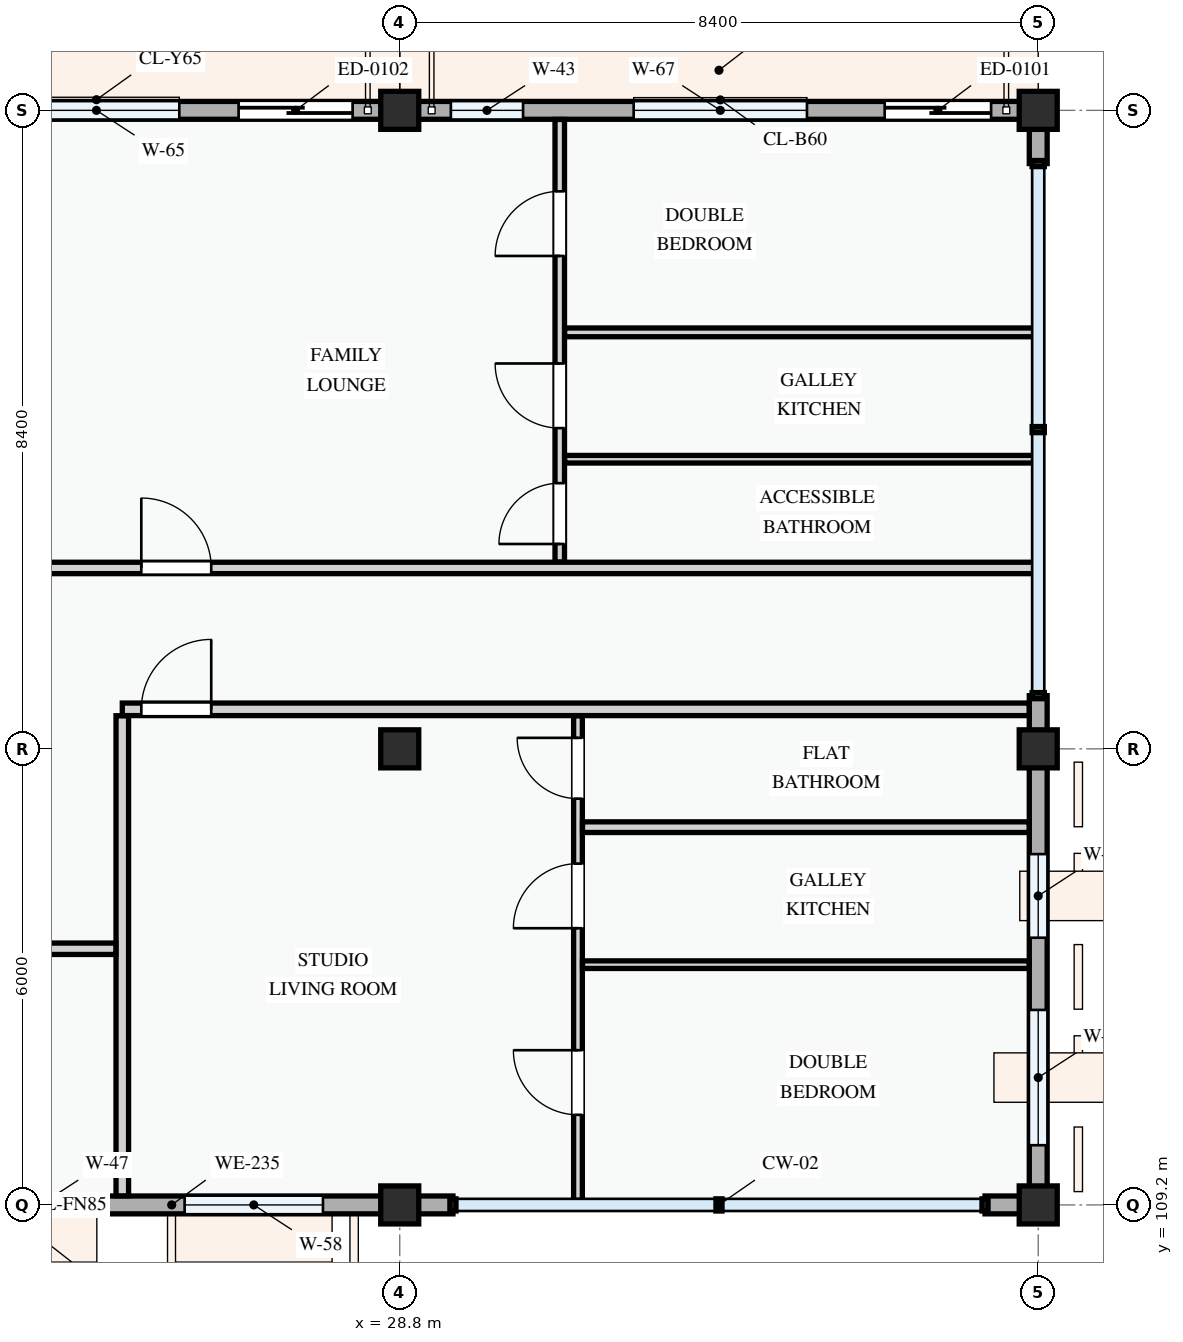
"""IFC4 building model, lengths in metres.
Left out: names, types, materials, properties, quantities, classifications, styles, units other than length and angle.
Written with IfcOpenShell. Run it as: python <this file> out.ifc"""

import sys

from ifc_helpers import new_model, si_unit, direction, frame, frame_2d, origin, origin_2d, place, context, subcontext, project, spatial, rectangle, extrude, element, fill, save


model = new_model("IFC4")
c1 = context("Model", 3, precision=1e-05, world=origin(), true_north=direction((0.0, 1.0)))
c2 = subcontext(c1, "Body", "Model", "MODEL_VIEW")
j1 = project(units=[si_unit("LENGTHUNIT", "METRE"), si_unit("PLANEANGLEUNIT", "RADIAN")], contexts=[c1])
p1 = place(None, origin())
s1 = spatial("IfcSite", under=j1, at=p1, CompositionType="ELEMENT")
p2 = place(p1, origin())
s2 = spatial("IfcBuilding", under=s1, at=p2, CompositionType="ELEMENT")
p3 = place(p2, frame((0.0, 0.0, 44.4)))
s3 = spatial("IfcBuildingStorey", under=s2, at=p3, CompositionType="ELEMENT", Elevation=44.4)
for number, where, z_axis, x_axis in (
    (1, (28.8, 109.2, 0.0), (0.0, 0.0, 1.0), (1.0, 0.0, 0.0)),
    (2, (28.8, 115.2, 0.0), (0.0, 0.0, 1.0), (1.0, 0.0, 0.0)),
    (3, (28.8, 123.6, 0.0), (0.0, 0.0, 1.0), (1.0, 0.0, 0.0)),
    (4, (37.2, 109.2, 0.0), (0.0, 0.0, 1.0), (1.0, 0.0, 0.0)),
    (5, (37.2, 115.2, 0.0), (0.0, 0.0, 1.0), (1.0, 0.0, 0.0)),
    (6, (37.2, 123.6, 0.0), (0.0, 0.0, 1.0), (1.0, 0.0, 0.0)),
):
    element("IfcColumn", number, at=place(p3, frame(where, z_axis=z_axis, x_axis=x_axis)), inside=s3, PredefinedType="COLUMN", context=c2, shape_type="SweptSolid", body=[
        extrude(rectangle(XDim=0.5, YDim=0.5, at=origin_2d()), origin(), (0.0, 0.0, 1.0), 3.3),
    ])
p4 = place(p3, frame((22.8, 109.2, 0.0), z_axis=(0.0, 0.0, 1.0), x_axis=(1.0, 0.0, 0.0)))
e7 = element("IfcWall", 7, at=p4, inside=s3, PredefinedType="STANDARD", context=c2, shape_type="SweptSolid", body=[
    extrude(rectangle(XDim=6.0, YDim=0.235, at=frame_2d((3.0, 0.0))), origin(), (0.0, 0.0, 1.0), 2.525),
])
p5 = place(p4, frame((0.645, 0.0, 0.78)))
e8 = element("IfcOpeningElement", 8, at=p5, cuts=e7, PredefinedType="OPENING", context=c2, shape_type="SweptSolid", body=[
    extrude(rectangle(XDim=1.25, YDim=1.45, at=frame_2d((0.625, 0.725))), frame((0.0, 0.127, 0.0), z_axis=(0.0, -1.0, 0.0), x_axis=(1.0, 0.0, 0.0)), (0.0, 0.0, 1.0), 0.255),
])
p6 = place(p4, frame((3.17, 0.0, 0.78)))
e9 = element("IfcOpeningElement", 9, at=p6, cuts=e7, PredefinedType="OPENING", context=c2, shape_type="SweptSolid", body=[
    extrude(rectangle(XDim=1.82, YDim=1.46, at=frame_2d((0.91, 0.73))), frame((0.0, 0.127, 0.0), z_axis=(0.0, -1.0, 0.0), x_axis=(1.0, 0.0, 0.0)), (0.0, 0.0, 1.0), 0.255),
])
p7 = place(p3, frame((28.8, 109.2, 0.0), z_axis=(0.0, 0.0, 1.0), x_axis=(1.0, 0.0, 0.0)))
e10 = element("IfcWall", 10, at=p7, inside=s3, PredefinedType="STANDARD", context=c2, shape_type="SweptSolid", body=[
    extrude(rectangle(XDim=0.7, YDim=0.235, at=frame_2d((0.35, 0.0))), origin(), (0.0, 0.0, 1.0), 2.375),
])
p8 = place(p3, frame((36.5, 109.2, 0.0), z_axis=(0.0, 0.0, 1.0), x_axis=(1.0, 0.0, 0.0)))
e11 = element("IfcWall", 11, at=p8, inside=s3, PredefinedType="STANDARD", context=c2, shape_type="SweptSolid", body=[
    extrude(rectangle(XDim=0.581, YDim=0.235, at=frame_2d((0.29, 0.0))), origin(), (0.0, 0.0, 1.0), 2.375),
])
p9 = place(p3, frame((37.2, 109.2, 0.0), z_axis=(0.0, 0.0, 1.0), x_axis=(0.0, 1.0, 0.0)))
e12 = element("IfcWall", 12, at=p9, inside=s3, PredefinedType="STANDARD", context=c2, shape_type="SweptSolid", body=[
    extrude(rectangle(XDim=6.0, YDim=0.235, at=frame_2d((3.0, 0.0))), origin(), (0.0, 0.0, 1.0), 2.575),
])
p10 = place(p9, frame((0.785, 0.0, 0.78)))
e13 = element("IfcOpeningElement", 13, at=p10, cuts=e12, PredefinedType="OPENING", context=c2, shape_type="SweptSolid", body=[
    extrude(rectangle(XDim=1.78, YDim=1.42, at=frame_2d((0.89, 0.71))), frame((0.0, 0.127, 0.0), z_axis=(0.0, -1.0, 0.0), x_axis=(1.0, 0.0, 0.0)), (0.0, 0.0, 1.0), 0.255),
])
p11 = place(p9, frame((3.515, 0.0, 0.78)))
e14 = element("IfcOpeningElement", 14, at=p11, cuts=e12, PredefinedType="OPENING", context=c2, shape_type="SweptSolid", body=[
    extrude(rectangle(XDim=1.1, YDim=1.3, at=frame_2d((0.55, 0.65))), frame((0.0, 0.127, 0.0), z_axis=(0.0, -1.0, 0.0), x_axis=(1.0, 0.0, 0.0)), (0.0, 0.0, 1.0), 0.255),
])
p12 = place(p3, frame((37.2, 115.2, 0.0), z_axis=(0.0, 0.0, 1.0), x_axis=(0.0, 1.0, 0.0)))
e15 = element("IfcWall", 15, at=p12, inside=s3, PredefinedType="STANDARD", context=c2, shape_type="SweptSolid", body=[
    extrude(rectangle(XDim=0.7, YDim=0.235, at=frame_2d((0.35, 0.0))), origin(), (0.0, 0.0, 1.0), 2.425),
])
p13 = place(p3, frame((37.2, 122.9, 0.0), z_axis=(0.0, 0.0, 1.0), x_axis=(0.0, 1.0, 0.0)))
e16 = element("IfcWall", 16, at=p13, inside=s3, PredefinedType="STANDARD", context=c2, shape_type="SweptSolid", body=[
    extrude(rectangle(XDim=0.581, YDim=0.235, at=frame_2d((0.29, 0.0))), origin(), (0.0, 0.0, 1.0), 2.425),
])
p14 = place(p3, frame((37.2, 123.6, 0.0), z_axis=(0.0, 0.0, 1.0), x_axis=(-1.0, 0.0, 0.0)))
e17 = element("IfcWall", 17, at=p14, inside=s3, PredefinedType="STANDARD", context=c2, shape_type="SweptSolid", body=[
    extrude(rectangle(XDim=8.4, YDim=0.235, at=frame_2d((4.2, 0.0))), origin(), (0.0, 0.0, 1.0), 2.375),
])
p15 = place(p14, frame((0.62, 0.0, 0.0)))
e18 = element("IfcOpeningElement", 18, at=p15, cuts=e17, PredefinedType="OPENING", context=c2, shape_type="SweptSolid", body=[
    extrude(rectangle(XDim=1.4, YDim=2.2, at=frame_2d((0.7, 1.1))), frame((0.0, 0.127, 0.0), z_axis=(0.0, -1.0, 0.0), x_axis=(1.0, 0.0, 0.0)), (0.0, 0.0, 1.0), 0.255),
])
p16 = place(p14, frame((3.042, 0.0, 0.78)))
e19 = element("IfcOpeningElement", 19, at=p16, cuts=e17, PredefinedType="OPENING", context=c2, shape_type="SweptSolid", body=[
    extrude(rectangle(XDim=2.28, YDim=1.46, at=frame_2d((1.14, 0.73))), frame((0.0, 0.127, 0.0), z_axis=(0.0, -1.0, 0.0), x_axis=(1.0, 0.0, 0.0)), (0.0, 0.0, 1.0), 0.255),
])
p17 = place(p14, frame((6.777, 0.0, 0.78)))
e20 = element("IfcOpeningElement", 20, at=p17, cuts=e17, PredefinedType="OPENING", context=c2, shape_type="SweptSolid", body=[
    extrude(rectangle(XDim=0.95, YDim=1.15, at=frame_2d((0.475, 0.575))), frame((0.0, 0.127, 0.0), z_axis=(0.0, -1.0, 0.0), x_axis=(1.0, 0.0, 0.0)), (0.0, 0.0, 1.0), 0.255),
])
p18 = place(p3, frame((28.8, 123.6, 0.0), z_axis=(0.0, 0.0, 1.0), x_axis=(-1.0, 0.0, 0.0)))
e21 = element("IfcWall", 21, at=p18, inside=s3, PredefinedType="STANDARD", context=c2, shape_type="SweptSolid", body=[
    extrude(rectangle(XDim=6.0, YDim=0.235, at=frame_2d((3.0, 0.0))), origin(), (0.0, 0.0, 1.0), 2.525),
])
p19 = place(p18, frame((0.62, 0.0, 0.0)))
e22 = element("IfcOpeningElement", 22, at=p19, cuts=e21, PredefinedType="OPENING", context=c2, shape_type="SweptSolid", body=[
    extrude(rectangle(XDim=1.5, YDim=2.2, at=frame_2d((0.75, 1.1))), frame((0.0, 0.127, 0.0), z_axis=(0.0, -1.0, 0.0), x_axis=(1.0, 0.0, 0.0)), (0.0, 0.0, 1.0), 0.255),
])
p20 = place(p18, frame((2.9, 0.0, 0.78)))
e23 = element("IfcOpeningElement", 23, at=p20, cuts=e21, PredefinedType="OPENING", context=c2, shape_type="SweptSolid", body=[
    extrude(rectangle(XDim=2.18, YDim=1.48, at=frame_2d((1.09, 0.74))), frame((0.0, 0.127, 0.0), z_axis=(0.0, -1.0, 0.0), x_axis=(1.0, 0.0, 0.0)), (0.0, 0.0, 1.0), 0.255),
])
p21 = place(p3, frame((25.15, 109.32, 0.0), z_axis=(0.0, 0.0, 1.0), x_axis=(0.0, 1.0, 0.0)))
e24 = element("IfcWall", 24, at=p21, inside=s3, PredefinedType="PARTITIONING", context=c2, shape_type="SweptSolid", body=[
    extrude(rectangle(XDim=6.316, YDim=0.165, at=frame_2d((3.158, 0.0))), origin(), (0.0, 0.0, 1.0), 3.0),
])
p22 = place(p3, frame((22.66, 112.57, 0.0), z_axis=(0.0, 0.0, 1.0), x_axis=(1.0, 0.0, 0.0)))
e25 = element("IfcWall", 25, at=p22, inside=s3, PredefinedType="PARTITIONING", context=c2, shape_type="SweptSolid", body=[
    extrude(rectangle(XDim=2.406, YDim=0.15, at=frame_2d((1.203, 0.0))), origin(), (0.0, 0.0, 1.0), 3.0),
])
p23 = place(p3, frame((31.145, 109.26, 0.0), z_axis=(0.0, 0.0, 1.0), x_axis=(0.0, 1.0, 0.0)))
e26 = element("IfcWall", 26, at=p23, inside=s3, PredefinedType="PARTITIONING", context=c2, shape_type="SweptSolid", body=[
    extrude(rectangle(XDim=6.375, YDim=0.115, at=frame_2d((3.188, 0.0))), origin(), (0.0, 0.0, 1.0), 3.0),
])
p24 = place(p23, frame((1.125, 0.0, 0.0)))
e27 = element("IfcOpeningElement", 27, at=p24, cuts=e26, PredefinedType="OPENING", context=c2, shape_type="SweptSolid", body=[
    extrude(rectangle(XDim=0.85, YDim=2.1, at=frame_2d((0.425, 1.05))), frame((0.0, 0.067, 0.0), z_axis=(0.0, -1.0, 0.0), x_axis=(1.0, 0.0, 0.0)), (0.0, 0.0, 1.0), 0.135),
])
p25 = place(p23, frame((3.58, 0.0, 0.0)))
e28 = element("IfcOpeningElement", 28, at=p25, cuts=e26, PredefinedType="OPENING", context=c2, shape_type="SweptSolid", body=[
    extrude(rectangle(XDim=0.85, YDim=2.1, at=frame_2d((0.425, 1.05))), frame((0.0, 0.067, 0.0), z_axis=(0.0, -1.0, 0.0), x_axis=(1.0, 0.0, 0.0)), (0.0, 0.0, 1.0), 0.135),
])
p26 = place(p23, frame((5.285, 0.0, 0.0)))
e29 = element("IfcOpeningElement", 29, at=p26, cuts=e26, PredefinedType="OPENING", context=c2, shape_type="SweptSolid", body=[
    extrude(rectangle(XDim=0.8, YDim=2.1, at=frame_2d((0.4, 1.05))), frame((0.0, 0.067, 0.0), z_axis=(0.0, -1.0, 0.0), x_axis=(1.0, 0.0, 0.0)), (0.0, 0.0, 1.0), 0.135),
])
p27 = place(p3, frame((31.205, 112.361, 0.0), z_axis=(0.0, 0.0, 1.0), x_axis=(1.0, 0.0, 0.0)))
e30 = element("IfcWall", 30, at=p27, inside=s3, PredefinedType="PARTITIONING", context=c2, shape_type="SweptSolid", body=[
    extrude(rectangle(XDim=5.876, YDim=0.1, at=frame_2d((2.938, 0.0))), origin(), (0.0, 0.0, 1.0), 3.0),
])
p28 = place(p3, frame((31.205, 114.17, 0.0), z_axis=(0.0, 0.0, 1.0), x_axis=(1.0, 0.0, 0.0)))
e31 = element("IfcWall", 31, at=p28, inside=s3, PredefinedType="PARTITIONING", context=c2, shape_type="SweptSolid", body=[
    extrude(rectangle(XDim=5.876, YDim=0.14, at=frame_2d((2.938, 0.0))), origin(), (0.0, 0.0, 1.0), 3.0),
])
p29 = place(p3, frame((30.905, 117.657, 0.0), z_axis=(0.0, 0.0, 1.0), x_axis=(0.0, 1.0, 0.0)))
e32 = element("IfcWall", 32, at=p29, inside=s3, PredefinedType="PARTITIONING", context=c2, shape_type="SweptSolid", body=[
    extrude(rectangle(XDim=5.823, YDim=0.125, at=frame_2d((2.912, 0.0))), origin(), (0.0, 0.0, 1.0), 3.0),
])
p30 = place(p29, frame((0.238, 0.0, 0.0)))
e33 = element("IfcOpeningElement", 33, at=p30, cuts=e32, PredefinedType="OPENING", context=c2, shape_type="SweptSolid", body=[
    extrude(rectangle(XDim=0.8, YDim=2.1, at=frame_2d((0.4, 1.05))), frame((0.0, 0.073, 0.0), z_axis=(0.0, -1.0, 0.0), x_axis=(1.0, 0.0, 0.0)), (0.0, 0.0, 1.0), 0.145),
])
p31 = place(p29, frame((1.763, 0.0, 0.0)))
e34 = element("IfcOpeningElement", 34, at=p31, cuts=e32, PredefinedType="OPENING", context=c2, shape_type="SweptSolid", body=[
    extrude(rectangle(XDim=0.85, YDim=2.1, at=frame_2d((0.425, 1.05))), frame((0.0, 0.073, 0.0), z_axis=(0.0, -1.0, 0.0), x_axis=(1.0, 0.0, 0.0)), (0.0, 0.0, 1.0), 0.145),
])
p32 = place(p29, frame((4.028, 0.0, 0.0)))
e35 = element("IfcOpeningElement", 35, at=p32, cuts=e32, PredefinedType="OPENING", context=c2, shape_type="SweptSolid", body=[
    extrude(rectangle(XDim=0.85, YDim=2.1, at=frame_2d((0.425, 1.05))), frame((0.0, 0.073, 0.0), z_axis=(0.0, -1.0, 0.0), x_axis=(1.0, 0.0, 0.0)), (0.0, 0.0, 1.0), 0.145),
])
p33 = place(p3, frame((30.97, 120.679, 0.0), z_axis=(0.0, 0.0, 1.0), x_axis=(1.0, 0.0, 0.0)))
e36 = element("IfcWall", 36, at=p33, inside=s3, PredefinedType="PARTITIONING", context=c2, shape_type="SweptSolid", body=[
    extrude(rectangle(XDim=6.17, YDim=0.115, at=frame_2d((3.085, 0.0))), origin(), (0.0, 0.0, 1.0), 3.0),
])
p34 = place(p3, frame((30.97, 119.01, 0.0), z_axis=(0.0, 0.0, 1.0), x_axis=(1.0, 0.0, 0.0)))
e37 = element("IfcWall", 37, at=p34, inside=s3, PredefinedType="PARTITIONING", context=c2, shape_type="SweptSolid", body=[
    extrude(rectangle(XDim=6.17, YDim=0.1, at=frame_2d((3.085, 0.0))), origin(), (0.0, 0.0, 1.0), 3.0),
])
p35 = place(p3, frame((25.15, 115.72, 0.0), z_axis=(0.0, 0.0, 1.0), x_axis=(1.0, 0.0, 0.0)))
e38 = element("IfcWall", 38, at=p35, inside=s3, PredefinedType="PARTITIONING", context=c2, shape_type="SweptSolid", body=[
    extrude(rectangle(XDim=11.931, YDim=0.165, at=frame_2d((5.965, 0.0))), origin(), (0.0, 0.0, 1.0), 3.0),
])
p36 = place(p35, frame((0.25, 0.0, 0.0)))
e39 = element("IfcOpeningElement", 39, at=p36, cuts=e38, PredefinedType="OPENING", context=c2, shape_type="SweptSolid", body=[
    extrude(rectangle(XDim=0.92, YDim=2.1, at=frame_2d((0.46, 1.05))), frame((0.0, 0.093, 0.0), z_axis=(0.0, -1.0, 0.0), x_axis=(1.0, 0.0, 0.0)), (0.0, 0.0, 1.0), 0.185),
])
p37 = place(p3, frame((22.66, 117.58, 0.0), z_axis=(0.0, 0.0, 1.0), x_axis=(1.0, 0.0, 0.0)))
e40 = element("IfcWall", 40, at=p37, inside=s3, PredefinedType="PARTITIONING", context=c2, shape_type="SweptSolid", body=[
    extrude(rectangle(XDim=14.48, YDim=0.15, at=frame_2d((7.24, 0.0))), origin(), (0.0, 0.0, 1.0), 3.0),
])
p38 = place(p37, frame((2.74, 0.0, 0.0)))
e41 = element("IfcOpeningElement", 41, at=p38, cuts=e40, PredefinedType="OPENING", context=c2, shape_type="SweptSolid", body=[
    extrude(rectangle(XDim=0.92, YDim=2.1, at=frame_2d((0.46, 1.05))), frame((0.0, 0.085, 0.0), z_axis=(0.0, -1.0, 0.0), x_axis=(1.0, 0.0, 0.0)), (0.0, 0.0, 1.0), 0.17),
])
p39 = place(p5, origin())
e42 = element("IfcWindow", 42, at=p39, inside=s3, PartitioningType="SINGLE_PANEL", PredefinedType="WINDOW", context=c2, shape_type="SweptSolid", body=[
    extrude(rectangle(XDim=1.25, YDim=1.45, at=frame_2d((0.625, 0.725))), frame((0.0, 0.03, 0.0), z_axis=(0.0, -1.0, 0.0), x_axis=(1.0, 0.0, 0.0)), (0.0, 0.0, 1.0), 0.06),
])
fill(e8, e42)
p40 = place(p6, origin())
e43 = element("IfcWindow", 43, at=p40, inside=s3, PartitioningType="DOUBLE_PANEL_VERTICAL", PredefinedType="WINDOW", context=c2, shape_type="SweptSolid", body=[
    extrude(rectangle(XDim=1.82, YDim=1.46, at=frame_2d((0.91, 0.73))), frame((0.0, 0.03, 0.0), z_axis=(0.0, -1.0, 0.0), x_axis=(1.0, 0.0, 0.0)), (0.0, 0.0, 1.0), 0.06),
])
fill(e9, e43)
p41 = place(p10, origin())
e44 = element("IfcWindow", 44, at=p41, inside=s3, PartitioningType="DOUBLE_PANEL_VERTICAL", PredefinedType="WINDOW", context=c2, shape_type="SweptSolid", body=[
    extrude(rectangle(XDim=1.78, YDim=1.42, at=frame_2d((0.89, 0.71))), frame((0.0, 0.03, 0.0), z_axis=(0.0, -1.0, 0.0), x_axis=(1.0, 0.0, 0.0)), (0.0, 0.0, 1.0), 0.06),
])
fill(e13, e44)
p42 = place(p11, origin())
e45 = element("IfcWindow", 45, at=p42, inside=s3, PartitioningType="SINGLE_PANEL", PredefinedType="WINDOW", context=c2, shape_type="SweptSolid", body=[
    extrude(rectangle(XDim=1.1, YDim=1.3, at=frame_2d((0.55, 0.65))), frame((0.0, 0.03, 0.0), z_axis=(0.0, -1.0, 0.0), x_axis=(1.0, 0.0, 0.0)), (0.0, 0.0, 1.0), 0.06),
])
fill(e14, e45)
p43 = place(p15, frame((1.4, 0.0, 0.0), z_axis=(0.0, 0.0, 1.0), x_axis=(-1.0, 0.0, 0.0)))
e46 = element("IfcDoor", 46, at=p43, inside=s3, OperationType="SLIDING_TO_LEFT", PredefinedType="DOOR", context=c2, shape_type="SweptSolid", body=[
    extrude(rectangle(XDim=1.4, YDim=2.2, at=frame_2d((0.7, 1.1))), frame((0.0, 0.025, 0.0), z_axis=(0.0, -1.0, 0.0), x_axis=(1.0, 0.0, 0.0)), (0.0, 0.0, 1.0), 0.05),
])
fill(e18, e46)
p44 = place(p16, origin())
e47 = element("IfcWindow", 47, at=p44, inside=s3, PartitioningType="DOUBLE_PANEL_VERTICAL", PredefinedType="WINDOW", context=c2, shape_type="SweptSolid", body=[
    extrude(rectangle(XDim=2.28, YDim=1.46, at=frame_2d((1.14, 0.73))), frame((0.0, 0.03, 0.0), z_axis=(0.0, -1.0, 0.0), x_axis=(1.0, 0.0, 0.0)), (0.0, 0.0, 1.0), 0.06),
])
fill(e19, e47)
p45 = place(p17, origin())
e48 = element("IfcWindow", 48, at=p45, inside=s3, PartitioningType="SINGLE_PANEL", PredefinedType="WINDOW", context=c2, shape_type="SweptSolid", body=[
    extrude(rectangle(XDim=0.95, YDim=1.15, at=frame_2d((0.475, 0.575))), frame((0.0, 0.03, 0.0), z_axis=(0.0, -1.0, 0.0), x_axis=(1.0, 0.0, 0.0)), (0.0, 0.0, 1.0), 0.06),
])
fill(e20, e48)
p46 = place(p19, frame((1.5, 0.0, 0.0), z_axis=(0.0, 0.0, 1.0), x_axis=(-1.0, 0.0, 0.0)))
e49 = element("IfcDoor", 49, at=p46, inside=s3, OperationType="SLIDING_TO_RIGHT", PredefinedType="DOOR", context=c2, shape_type="SweptSolid", body=[
    extrude(rectangle(XDim=1.5, YDim=2.2, at=frame_2d((0.75, 1.1))), frame((0.0, 0.025, 0.0), z_axis=(0.0, -1.0, 0.0), x_axis=(1.0, 0.0, 0.0)), (0.0, 0.0, 1.0), 0.05),
])
fill(e22, e49)
p47 = place(p20, origin())
e50 = element("IfcWindow", 50, at=p47, inside=s3, PartitioningType="DOUBLE_PANEL_VERTICAL", PredefinedType="WINDOW", context=c2, shape_type="SweptSolid", body=[
    extrude(rectangle(XDim=2.18, YDim=1.48, at=frame_2d((1.09, 0.74))), frame((0.0, 0.03, 0.0), z_axis=(0.0, -1.0, 0.0), x_axis=(1.0, 0.0, 0.0)), (0.0, 0.0, 1.0), 0.06),
])
fill(e23, e50)
p48 = place(p24, origin())
e51 = element("IfcDoor", 51, at=p48, inside=s3, OperationType="SINGLE_SWING_RIGHT", PredefinedType="DOOR", context=c2, shape_type="SweptSolid", body=[
    extrude(rectangle(XDim=0.85, YDim=2.1, at=frame_2d((0.425, 1.05))), frame((0.0, 0.025, 0.0), z_axis=(0.0, -1.0, 0.0), x_axis=(1.0, 0.0, 0.0)), (0.0, 0.0, 1.0), 0.05),
])
fill(e27, e51)
p49 = place(p25, origin())
e52 = element("IfcDoor", 52, at=p49, inside=s3, OperationType="SINGLE_SWING_LEFT", PredefinedType="DOOR", context=c2, shape_type="SweptSolid", body=[
    extrude(rectangle(XDim=0.85, YDim=2.1, at=frame_2d((0.425, 1.05))), frame((0.0, 0.025, 0.0), z_axis=(0.0, -1.0, 0.0), x_axis=(1.0, 0.0, 0.0)), (0.0, 0.0, 1.0), 0.05),
])
fill(e28, e52)
p50 = place(p26, origin())
e53 = element("IfcDoor", 53, at=p50, inside=s3, OperationType="SINGLE_SWING_RIGHT", PredefinedType="DOOR", context=c2, shape_type="SweptSolid", body=[
    extrude(rectangle(XDim=0.8, YDim=2.1, at=frame_2d((0.4, 1.05))), frame((0.0, 0.025, 0.0), z_axis=(0.0, -1.0, 0.0), x_axis=(1.0, 0.0, 0.0)), (0.0, 0.0, 1.0), 0.05),
])
fill(e29, e53)
p51 = place(p30, origin())
e54 = element("IfcDoor", 54, at=p51, inside=s3, OperationType="SINGLE_SWING_LEFT", PredefinedType="DOOR", context=c2, shape_type="SweptSolid", body=[
    extrude(rectangle(XDim=0.8, YDim=2.1, at=frame_2d((0.4, 1.05))), frame((0.0, 0.025, 0.0), z_axis=(0.0, -1.0, 0.0), x_axis=(1.0, 0.0, 0.0)), (0.0, 0.0, 1.0), 0.05),
])
fill(e33, e54)
p52 = place(p31, origin())
e55 = element("IfcDoor", 55, at=p52, inside=s3, OperationType="SINGLE_SWING_RIGHT", PredefinedType="DOOR", context=c2, shape_type="SweptSolid", body=[
    extrude(rectangle(XDim=0.85, YDim=2.1, at=frame_2d((0.425, 1.05))), frame((0.0, 0.025, 0.0), z_axis=(0.0, -1.0, 0.0), x_axis=(1.0, 0.0, 0.0)), (0.0, 0.0, 1.0), 0.05),
])
fill(e34, e55)
p53 = place(p32, origin())
e56 = element("IfcDoor", 56, at=p53, inside=s3, OperationType="SINGLE_SWING_LEFT", PredefinedType="DOOR", context=c2, shape_type="SweptSolid", body=[
    extrude(rectangle(XDim=0.85, YDim=2.1, at=frame_2d((0.425, 1.05))), frame((0.0, 0.025, 0.0), z_axis=(0.0, -1.0, 0.0), x_axis=(1.0, 0.0, 0.0)), (0.0, 0.0, 1.0), 0.05),
])
fill(e35, e56)
p54 = place(p36, origin())
e57 = element("IfcDoor", 57, at=p54, inside=s3, OperationType="SINGLE_SWING_RIGHT", PredefinedType="DOOR", context=c2, shape_type="SweptSolid", body=[
    extrude(rectangle(XDim=0.92, YDim=2.1, at=frame_2d((0.46, 1.05))), frame((0.0, 0.025, 0.0), z_axis=(0.0, -1.0, 0.0), x_axis=(1.0, 0.0, 0.0)), (0.0, 0.0, 1.0), 0.05),
])
fill(e39, e57)
p55 = place(p38, origin())
e58 = element("IfcDoor", 58, at=p55, inside=s3, OperationType="SINGLE_SWING_LEFT", PredefinedType="DOOR", context=c2, shape_type="SweptSolid", body=[
    extrude(rectangle(XDim=0.92, YDim=2.1, at=frame_2d((0.46, 1.05))), frame((0.0, 0.025, 0.0), z_axis=(0.0, -1.0, 0.0), x_axis=(1.0, 0.0, 0.0)), (0.0, 0.0, 1.0), 0.05),
])
fill(e41, e58)
save(model, sys.argv[1])
